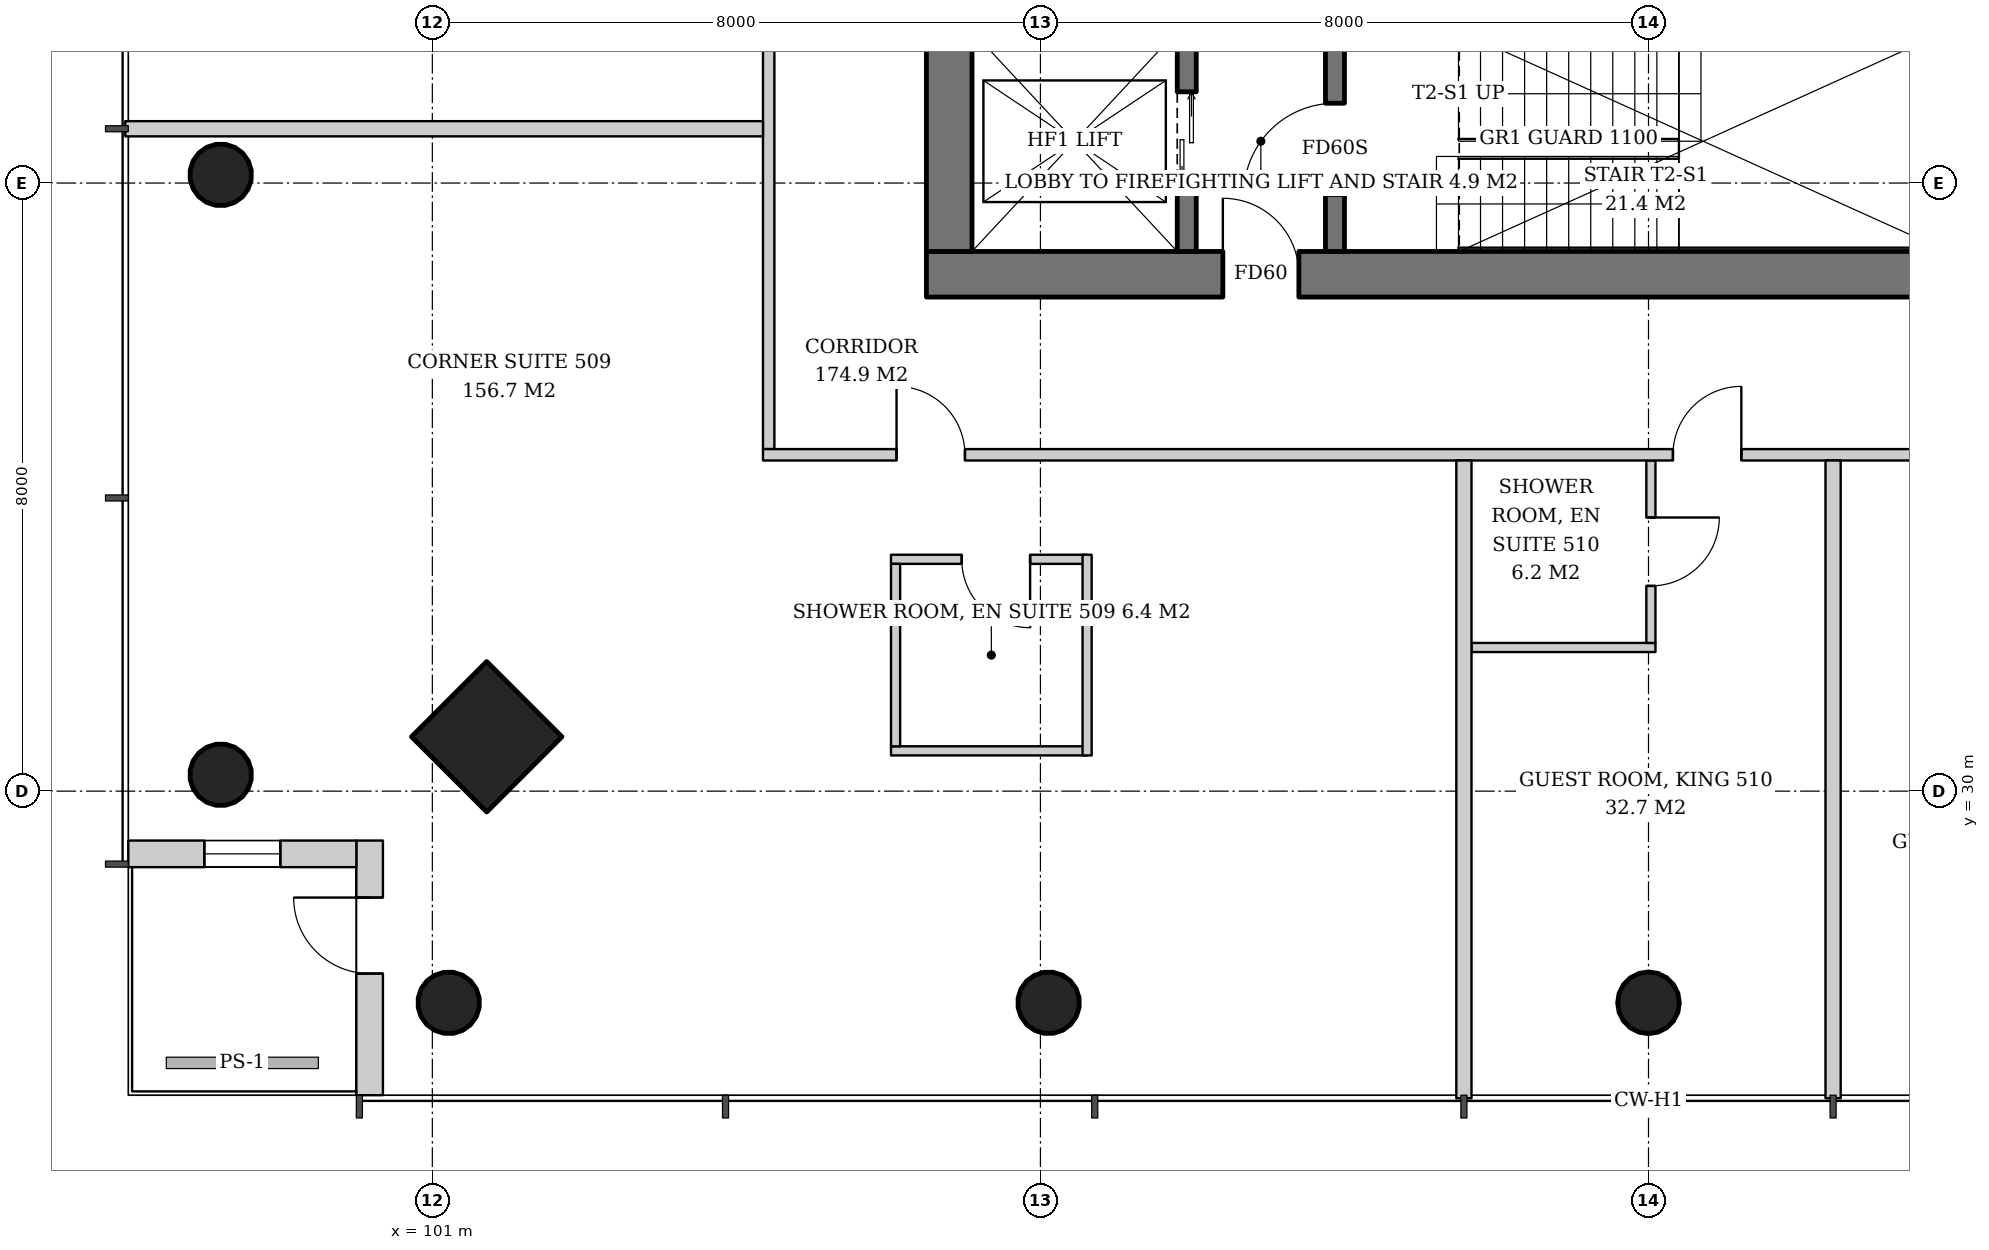
"""IFC4 building model, lengths in metres.
Left out: names, types, materials, properties, quantities, classifications, styles, units other than length and angle.
Written with IfcOpenShell. Run it as: python <this file> out.ifc"""

import sys

from ifc_helpers import new_model, si_unit, direction, frame, frame_2d, origin, origin_2d, place, context, subcontext, project, spatial, rectangle, hollow_circle, extrude, element, fill, save


model = new_model("IFC4")
c1 = context("Model", 3, precision=1e-05, world=origin(), true_north=direction((0.0, 1.0)))
c2 = subcontext(c1, "Body", "Model", "MODEL_VIEW")
j1 = project(units=[si_unit("LENGTHUNIT", "METRE"), si_unit("PLANEANGLEUNIT", "RADIAN")], contexts=[c1])
p1 = place(None, origin())
s1 = spatial("IfcSite", under=j1, at=p1, CompositionType="ELEMENT")
p2 = place(p1, origin())
s2 = spatial("IfcBuilding", under=s1, at=p2, CompositionType="ELEMENT")
p3 = place(p2, frame((0.0, 0.0, 24.8)))
s3 = spatial("IfcBuildingStorey", under=s2, at=p3, CompositionType="ELEMENT", Elevation=24.8)
p4 = place(p3, frame((101.664, 30.664, 0.0), z_axis=(0.043029647111, 0.043029647111, 0.998146732169), x_axis=(-0.707106781187, 0.707106781187, 0.0)))
e1 = element("IfcColumn", 1, at=p4, inside=s3, PredefinedType="COLUMN", context=c2, shape_type="SweptSolid", body=[
    extrude(rectangle(XDim=1.4, YDim=1.4, at=origin_2d()), origin(), (0.0, 0.0, 1.0), 3.807),
])
p5 = place(p3, frame((98.164, 30.164, 0.0), z_axis=(0.043029647111, 0.043029647111, 0.998146732169), x_axis=(-0.707106781187, 0.707106781187, 0.0)))
e2 = element("IfcColumn", 2, at=p5, inside=s3, PredefinedType="COLUMN", context=c2, shape_type="SweptSolid", body=[
    extrude(hollow_circle(Radius=0.406, WallThickness=0.03, at=origin_2d()), origin(), (0.0, 0.0, 1.0), 3.807),
])
p6 = place(p3, frame((98.164, 38.082, 0.0), z_axis=(0.043059525333, 0.021561848751, 0.998839808957), x_axis=(-0.44774654769, 0.894160516368, 0.0)))
e3 = element("IfcColumn", 3, at=p6, inside=s3, PredefinedType="COLUMN", context=c2, shape_type="SweptSolid", body=[
    extrude(hollow_circle(Radius=0.406, WallThickness=0.03, at=origin_2d()), origin(), (0.0, 0.0, 1.0), 3.804),
])
p7 = place(p3, frame((101.164, 27.164, 0.0), z_axis=(0.043029647111, 0.043029647111, 0.998146732169), x_axis=(-0.707106781187, 0.707106781187, 0.0)))
e4 = element("IfcColumn", 4, at=p7, inside=s3, PredefinedType="COLUMN", context=c2, shape_type="SweptSolid", body=[
    extrude(hollow_circle(Radius=0.406, WallThickness=0.03, at=origin_2d()), origin(), (0.0, 0.0, 1.0), 3.807),
])
p8 = place(p3, frame((109.082, 27.164, 0.0), z_axis=(0.021561848751, 0.043059525333, 0.998839808957), x_axis=(-0.894160516368, 0.44774654769, 0.0)))
e5 = element("IfcColumn", 5, at=p8, inside=s3, PredefinedType="COLUMN", context=c2, shape_type="SweptSolid", body=[
    extrude(hollow_circle(Radius=0.406, WallThickness=0.03, at=origin_2d()), origin(), (0.0, 0.0, 1.0), 3.804),
])
p9 = place(p3, frame((117.0, 27.164, 0.0), z_axis=(0.0, 0.043069538298, 0.999072076915), x_axis=(-1.0, 0.0, 0.0)))
e6 = element("IfcColumn", 6, at=p9, inside=s3, PredefinedType="COLUMN", context=c2, shape_type="SweptSolid", body=[
    extrude(hollow_circle(Radius=0.406, WallThickness=0.03, at=origin_2d()), origin(), (0.0, 0.0, 1.0), 3.803),
])
p10 = place(p3, frame((107.5, 36.8, 0.0), z_axis=(0.0, 0.0, 1.0), x_axis=(1.0, 0.0, 0.0)))
e7 = element("IfcWall", 7, at=p10, inside=s3, PredefinedType="SHEAR", context=c2, shape_type="SweptSolid", body=[
    extrude(rectangle(XDim=19.0, YDim=0.6, at=frame_2d((9.5, 0.0))), origin(), (0.0, 0.0, 1.0), 3.8),
])
p11 = place(p10, frame((3.9, 0.0, 0.0)))
e8 = element("IfcOpeningElement", 8, at=p11, cuts=e7, PredefinedType="OPENING", context=c2, shape_type="SweptSolid", body=[
    extrude(rectangle(XDim=1.0, YDim=2.1, at=frame_2d((0.5, 1.05))), frame((0.0, 0.31, 0.0), z_axis=(0.0, -1.0, 0.0), x_axis=(1.0, 0.0, 0.0)), (0.0, 0.0, 1.0), 0.62),
])
p12 = place(p10, frame((15.615, 0.0, 0.0)))
e9 = element("IfcOpeningElement", 9, at=p12, cuts=e7, PredefinedType="OPENING", context=c2, shape_type="SweptSolid", body=[
    extrude(rectangle(XDim=1.0, YDim=2.1, at=frame_2d((0.5, 1.05))), frame((0.0, 0.31, 0.0), z_axis=(0.0, -1.0, 0.0), x_axis=(1.0, 0.0, 0.0)), (0.0, 0.0, 1.0), 0.62),
])
p13 = place(p3, frame((107.8, 37.1, 0.0), z_axis=(0.0, 0.0, 1.0), x_axis=(0.0, 1.0, 0.0)))
e10 = element("IfcWall", 10, at=p13, inside=s3, PredefinedType="SHEAR", context=c2, shape_type="SweptSolid", body=[
    extrude(rectangle(XDim=17.8, YDim=0.6, at=frame_2d((8.9, 0.0))), origin(), (0.0, 0.0, 1.0), 3.8),
])
p14 = place(p13, frame((8.0, 0.0, 0.0)))
e11 = element("IfcOpeningElement", 11, at=p14, cuts=e10, PredefinedType="OPENING", context=c2, shape_type="SweptSolid", body=[
    extrude(rectangle(XDim=1.8, YDim=2.4, at=frame_2d((0.9, 1.2))), frame((0.0, 0.31, 0.0), z_axis=(0.0, -1.0, 0.0), x_axis=(1.0, 0.0, 0.0)), (0.0, 0.0, 1.0), 0.62),
])
p15 = place(p3, frame((100.175, 26.0, 0.0), z_axis=(0.0, 0.0, 1.0), x_axis=(0.0, 1.0, 0.0)))
e12 = element("IfcWall", 12, at=p15, inside=s3, PredefinedType="SOLIDWALL", context=c2, shape_type="SweptSolid", body=[
    extrude(rectangle(XDim=3.35, YDim=0.35, at=frame_2d((1.675, 0.0))), origin(), (0.0, 0.0, 1.0), 3.6),
])
p16 = place(p15, frame((1.6, 0.0, 0.0)))
e13 = element("IfcOpeningElement", 13, at=p16, cuts=e12, PredefinedType="OPENING", context=c2, shape_type="SweptSolid", body=[
    extrude(rectangle(XDim=1.0, YDim=2.4, at=frame_2d((0.5, 1.2))), frame((0.0, 0.185, 0.0), z_axis=(0.0, -1.0, 0.0), x_axis=(1.0, 0.0, 0.0)), (0.0, 0.0, 1.0), 0.37),
])
p17 = place(p3, frame((100.0, 29.175, 0.0), z_axis=(0.0, 0.0, 1.0), x_axis=(-1.0, 0.0, 0.0)))
e14 = element("IfcWall", 14, at=p17, inside=s3, PredefinedType="SOLIDWALL", context=c2, shape_type="SweptSolid", body=[
    extrude(rectangle(XDim=3.0, YDim=0.35, at=frame_2d((1.5, 0.0))), origin(), (0.0, 0.0, 1.0), 3.6),
])
p18 = place(p17, frame((1.0, 0.0, 0.9)))
e15 = element("IfcOpeningElement", 15, at=p18, cuts=e14, PredefinedType="OPENING", context=c2, shape_type="SweptSolid", body=[
    extrude(rectangle(XDim=1.0, YDim=2.4, at=frame_2d((0.5, 1.2))), frame((0.0, 0.185, 0.0), z_axis=(0.0, -1.0, 0.0), x_axis=(1.0, 0.0, 0.0)), (0.0, 0.0, 1.0), 0.37),
])
p19 = place(p3, frame((110.925, 37.1, 0.0), z_axis=(0.0, 0.0, 1.0), x_axis=(0.0, 1.0, 0.0)))
e16 = element("IfcWall", 16, at=p19, inside=s3, PredefinedType="SHEAR", context=c2, shape_type="SweptSolid", body=[
    extrude(rectangle(XDim=2.9, YDim=0.25, at=frame_2d((1.45, 0.0))), origin(), (0.0, 0.0, 1.0), 3.8),
])
p20 = place(p19, frame((0.8, 0.0, 0.0)))
e17 = element("IfcOpeningElement", 17, at=p20, cuts=e16, PredefinedType="OPENING", context=c2, shape_type="SweptSolid", body=[
    extrude(rectangle(XDim=1.3, YDim=2.2, at=frame_2d((0.65, 1.1))), frame((0.0, 0.135, 0.0), z_axis=(0.0, -1.0, 0.0), x_axis=(1.0, 0.0, 0.0)), (0.0, 0.0, 1.0), 0.27),
])
p21 = place(p3, frame((112.875, 37.1, 0.0), z_axis=(0.0, 0.0, 1.0), x_axis=(0.0, 1.0, 0.0)))
e18 = element("IfcWall", 18, at=p21, inside=s3, PredefinedType="SHEAR", context=c2, shape_type="SweptSolid", body=[
    extrude(rectangle(XDim=2.9, YDim=0.25, at=frame_2d((1.45, 0.0))), origin(), (0.0, 0.0, 1.0), 3.8),
])
p22 = place(p21, frame((0.75, 0.0, 0.0)))
e19 = element("IfcOpeningElement", 19, at=p22, cuts=e18, PredefinedType="OPENING", context=c2, shape_type="SweptSolid", body=[
    extrude(rectangle(XDim=1.2, YDim=2.1, at=frame_2d((0.6, 1.05))), frame((0.0, 0.135, 0.0), z_axis=(0.0, -1.0, 0.0), x_axis=(1.0, 0.0, 0.0)), (0.0, 0.0, 1.0), 0.27),
])
p23 = place(p3, frame((105.425, 57.65, 0.0), z_axis=(0.0, 0.0, 1.0), x_axis=(0.0, -1.0, 0.0)))
e20 = element("IfcWall", 20, at=p23, inside=s3, PredefinedType="PARTITIONING", context=c2, shape_type="SweptSolid", body=[
    extrude(rectangle(XDim=23.15, YDim=0.15, at=frame_2d((11.575, 0.0))), origin(), (0.0, 0.0, 1.0), 2.8),
])
p24 = place(p23, frame((1.757, 0.0, 0.0)))
e21 = element("IfcOpeningElement", 21, at=p24, cuts=e20, PredefinedType="OPENING", context=c2, shape_type="SweptSolid", body=[
    extrude(rectangle(XDim=0.9, YDim=2.1, at=frame_2d((0.45, 1.05))), frame((0.0, 0.085, 0.0), z_axis=(0.0, -1.0, 0.0), x_axis=(1.0, 0.0, 0.0)), (0.0, 0.0, 1.0), 0.17),
])
p25 = place(p23, frame((7.064, 0.0, 0.0)))
e22 = element("IfcOpeningElement", 22, at=p25, cuts=e20, PredefinedType="OPENING", context=c2, shape_type="SweptSolid", body=[
    extrude(rectangle(XDim=1.0, YDim=2.1, at=frame_2d((0.5, 1.05))), frame((0.0, 0.085, 0.0), z_axis=(0.0, -1.0, 0.0), x_axis=(1.0, 0.0, 0.0)), (0.0, 0.0, 1.0), 0.17),
])
p26 = place(p23, frame((10.428, 0.0, 0.0)))
e23 = element("IfcOpeningElement", 23, at=p26, cuts=e20, PredefinedType="OPENING", context=c2, shape_type="SweptSolid", body=[
    extrude(rectangle(XDim=0.9, YDim=2.1, at=frame_2d((0.45, 1.05))), frame((0.0, 0.085, 0.0), z_axis=(0.0, -1.0, 0.0), x_axis=(1.0, 0.0, 0.0)), (0.0, 0.0, 1.0), 0.17),
])
p27 = place(p23, frame((16.829, 0.0, 0.0)))
e24 = element("IfcOpeningElement", 24, at=p27, cuts=e20, PredefinedType="OPENING", context=c2, shape_type="SweptSolid", body=[
    extrude(rectangle(XDim=0.9, YDim=2.1, at=frame_2d((0.45, 1.05))), frame((0.0, 0.085, 0.0), z_axis=(0.0, -1.0, 0.0), x_axis=(1.0, 0.0, 0.0)), (0.0, 0.0, 1.0), 0.17),
])
p28 = place(p3, frame((105.35, 38.714, 0.0), z_axis=(0.0, 0.0, 1.0), x_axis=(-1.0, 0.0, 0.0)))
e25 = element("IfcWall", 25, at=p28, inside=s3, PredefinedType="PARTITIONING", context=c2, shape_type="SweptSolid", body=[
    extrude(rectangle(XDim=8.39, YDim=0.2, at=frame_2d((4.195, 0.0))), origin(), (0.0, 0.0, 1.0), 3.05),
])
p29 = place(p3, frame((109.614, 33.05, 0.0), z_axis=(0.0, 0.0, 1.0), x_axis=(-1.0, 0.0, 0.0)))
e26 = element("IfcWall", 26, at=p29, inside=s3, PredefinedType="PARTITIONING", context=c2, shape_type="SweptSolid", body=[
    extrude(rectangle(XDim=2.58, YDim=0.12, at=frame_2d((1.29, 0.0))), origin(), (0.0, 0.0, 1.0), 2.8),
])
p30 = place(p29, frame((0.75, 0.0, 0.0)))
e27 = element("IfcOpeningElement", 27, at=p30, cuts=e26, PredefinedType="OPENING", context=c2, shape_type="SweptSolid", body=[
    extrude(rectangle(XDim=0.9, YDim=2.1, at=frame_2d((0.45, 1.05))), frame((0.0, 0.07, 0.0), z_axis=(0.0, -1.0, 0.0), x_axis=(1.0, 0.0, 0.0)), (0.0, 0.0, 1.0), 0.14),
])
p31 = place(p3, frame((109.614, 30.53, 0.0), z_axis=(0.0, 0.0, 1.0), x_axis=(-1.0, 0.0, 0.0)))
e28 = element("IfcWall", 28, at=p31, inside=s3, PredefinedType="PARTITIONING", context=c2, shape_type="SweptSolid", body=[
    extrude(rectangle(XDim=2.58, YDim=0.12, at=frame_2d((1.29, 0.0))), origin(), (0.0, 0.0, 1.0), 2.8),
])
p32 = place(p3, frame((107.094, 32.99, 0.0), z_axis=(0.0, 0.0, 1.0), x_axis=(0.0, -1.0, 0.0)))
e29 = element("IfcWall", 29, at=p32, inside=s3, PredefinedType="PARTITIONING", context=c2, shape_type="SweptSolid", body=[
    extrude(rectangle(XDim=2.4, YDim=0.12, at=frame_2d((1.2, 0.0))), origin(), (0.0, 0.0, 1.0), 2.847),
])
p33 = place(p3, frame((109.614, 33.11, 0.0), z_axis=(0.0, 0.0, 1.0), x_axis=(0.0, -1.0, 0.0)))
e30 = element("IfcWall", 30, at=p33, inside=s3, PredefinedType="PARTITIONING", context=c2, shape_type="SweptSolid", body=[
    extrude(rectangle(XDim=2.64, YDim=0.12, at=frame_2d((1.32, 0.0))), origin(), (0.0, 0.0, 1.0), 3.6),
])
p34 = place(p3, frame((114.671, 31.89, 0.0), z_axis=(0.0, 0.0, 1.0), x_axis=(1.0, 0.0, 0.0)))
e31 = element("IfcWall", 31, at=p34, inside=s3, PredefinedType="PARTITIONING", context=c2, shape_type="SweptSolid", body=[
    extrude(rectangle(XDim=2.42, YDim=0.12, at=frame_2d((1.21, 0.0))), origin(), (0.0, 0.0, 1.0), 2.847),
])
p35 = place(p3, frame((117.031, 34.35, 0.0), z_axis=(0.0, 0.0, 1.0), x_axis=(0.0, -1.0, 0.0)))
e32 = element("IfcWall", 32, at=p35, inside=s3, PredefinedType="PARTITIONING", context=c2, shape_type="SweptSolid", body=[
    extrude(rectangle(XDim=2.4, YDim=0.12, at=frame_2d((1.2, 0.0))), origin(), (0.0, 0.0, 1.0), 3.6),
])
p36 = place(p35, frame((0.75, 0.0, 0.0)))
e33 = element("IfcOpeningElement", 33, at=p36, cuts=e32, PredefinedType="OPENING", context=c2, shape_type="SweptSolid", body=[
    extrude(rectangle(XDim=0.9, YDim=2.1, at=frame_2d((0.45, 1.05))), frame((0.0, 0.07, 0.0), z_axis=(0.0, -1.0, 0.0), x_axis=(1.0, 0.0, 0.0)), (0.0, 0.0, 1.0), 0.14),
])
p37 = place(p3, frame((105.35, 34.425, 0.0), z_axis=(0.0, 0.0, 1.0), x_axis=(1.0, 0.0, 0.0)))
e34 = element("IfcWall", 34, at=p37, inside=s3, PredefinedType="PARTITIONING", context=c2, shape_type="SweptSolid", body=[
    extrude(rectangle(XDim=23.15, YDim=0.15, at=frame_2d((11.575, 0.0))), origin(), (0.0, 0.0, 1.0), 2.8),
])
p38 = place(p37, frame((1.757, 0.0, 0.0)))
e35 = element("IfcOpeningElement", 35, at=p38, cuts=e34, PredefinedType="OPENING", context=c2, shape_type="SweptSolid", body=[
    extrude(rectangle(XDim=0.9, YDim=2.1, at=frame_2d((0.45, 1.05))), frame((0.0, 0.085, 0.0), z_axis=(0.0, -1.0, 0.0), x_axis=(1.0, 0.0, 0.0)), (0.0, 0.0, 1.0), 0.17),
])
p39 = place(p37, frame((11.971, 0.0, 0.0)))
e36 = element("IfcOpeningElement", 36, at=p39, cuts=e34, PredefinedType="OPENING", context=c2, shape_type="SweptSolid", body=[
    extrude(rectangle(XDim=0.9, YDim=2.1, at=frame_2d((0.45, 1.05))), frame((0.0, 0.085, 0.0), z_axis=(0.0, -1.0, 0.0), x_axis=(1.0, 0.0, 0.0)), (0.0, 0.0, 1.0), 0.17),
])
p40 = place(p37, frame((15.286, 0.0, 0.0)))
e37 = element("IfcOpeningElement", 37, at=p40, cuts=e34, PredefinedType="OPENING", context=c2, shape_type="SweptSolid", body=[
    extrude(rectangle(XDim=0.9, YDim=2.1, at=frame_2d((0.45, 1.05))), frame((0.0, 0.085, 0.0), z_axis=(0.0, -1.0, 0.0), x_axis=(1.0, 0.0, 0.0)), (0.0, 0.0, 1.0), 0.17),
])
for number, where, z_axis, x_axis in (
    (38, (114.572, 34.35, 0.0), (0.0, 0.0, 1.0), (0.0, -1.0, 0.0)),
    (39, (119.428, 34.35, 0.0), (0.0, 0.0, 1.0), (0.0, -1.0, 0.0)),
):
    element("IfcWall", number, at=place(p3, frame(where, z_axis=z_axis, x_axis=x_axis)), inside=s3, PredefinedType="PARTITIONING", context=c2, shape_type="SweptSolid", body=[
        extrude(rectangle(XDim=8.39, YDim=0.2, at=frame_2d((4.195, 0.0))), origin(), (0.0, 0.0, 1.0), 3.05),
    ])
p41 = place(p16, origin())
e40 = element("IfcDoor", 40, at=p41, inside=s3, OperationType="SINGLE_SWING_RIGHT", PredefinedType="DOOR", context=c2, shape_type="SweptSolid", body=[
    extrude(rectangle(XDim=1.0, YDim=2.4, at=frame_2d((0.5, 1.2))), frame((0.0, 0.025, 0.0), z_axis=(0.0, -1.0, 0.0), x_axis=(1.0, 0.0, 0.0)), (0.0, 0.0, 1.0), 0.05),
])
fill(e13, e40)
p42 = place(p18, origin())
e41 = element("IfcWindow", 41, at=p42, inside=s3, PartitioningType="SINGLE_PANEL", PredefinedType="WINDOW", context=c2, shape_type="SweptSolid", body=[
    extrude(rectangle(XDim=1.0, YDim=2.4, at=frame_2d((0.5, 1.2))), frame((0.0, 0.03, 0.0), z_axis=(0.0, -1.0, 0.0), x_axis=(1.0, 0.0, 0.0)), (0.0, 0.0, 1.0), 0.06),
])
fill(e15, e41)
p43 = place(p20, origin())
e42 = element("IfcDoor", 42, at=p43, inside=s3, OperationType="DOUBLE_DOOR_SLIDING", PredefinedType="DOOR", context=c2, shape_type="SweptSolid", body=[
    extrude(rectangle(XDim=1.3, YDim=2.2, at=frame_2d((0.65, 1.1))), frame((0.0, 0.025, 0.0), z_axis=(0.0, -1.0, 0.0), x_axis=(1.0, 0.0, 0.0)), (0.0, 0.0, 1.0), 0.05),
])
fill(e17, e42)
p44 = place(p22, origin())
e43 = element("IfcDoor", 43, at=p44, inside=s3, OperationType="SINGLE_SWING_LEFT", PredefinedType="DOOR", context=c2, shape_type="SweptSolid", body=[
    extrude(rectangle(XDim=1.2, YDim=2.1, at=frame_2d((0.6, 1.05))), frame((0.0, 0.025, 0.0), z_axis=(0.0, -1.0, 0.0), x_axis=(1.0, 0.0, 0.0)), (0.0, 0.0, 1.0), 0.05),
])
fill(e19, e43)
p45 = place(p11, origin())
e44 = element("IfcDoor", 44, at=p45, inside=s3, OperationType="SINGLE_SWING_LEFT", PredefinedType="DOOR", context=c2, shape_type="SweptSolid", body=[
    extrude(rectangle(XDim=1.0, YDim=2.1, at=frame_2d((0.5, 1.05))), frame((0.0, 0.025, 0.0), z_axis=(0.0, -1.0, 0.0), x_axis=(1.0, 0.0, 0.0)), (0.0, 0.0, 1.0), 0.05),
])
fill(e8, e44)
p46 = place(p30, origin())
e45 = element("IfcDoor", 45, at=p46, inside=s3, OperationType="SINGLE_SWING_LEFT", PredefinedType="DOOR", context=c2, shape_type="SweptSolid", body=[
    extrude(rectangle(XDim=0.9, YDim=2.1, at=frame_2d((0.45, 1.05))), frame((0.0, 0.025, 0.0), z_axis=(0.0, -1.0, 0.0), x_axis=(1.0, 0.0, 0.0)), (0.0, 0.0, 1.0), 0.05),
])
fill(e27, e45)
p47 = place(p36, origin())
e46 = element("IfcDoor", 46, at=p47, inside=s3, OperationType="SINGLE_SWING_LEFT", PredefinedType="DOOR", context=c2, shape_type="SweptSolid", body=[
    extrude(rectangle(XDim=0.9, YDim=2.1, at=frame_2d((0.45, 1.05))), frame((0.0, 0.025, 0.0), z_axis=(0.0, -1.0, 0.0), x_axis=(1.0, 0.0, 0.0)), (0.0, 0.0, 1.0), 0.05),
])
fill(e33, e46)
p48 = place(p38, origin())
e47 = element("IfcDoor", 47, at=p48, inside=s3, OperationType="SINGLE_SWING_LEFT", PredefinedType="DOOR", context=c2, shape_type="SweptSolid", body=[
    extrude(rectangle(XDim=0.9, YDim=2.1, at=frame_2d((0.45, 1.05))), frame((0.0, 0.025, 0.0), z_axis=(0.0, -1.0, 0.0), x_axis=(1.0, 0.0, 0.0)), (0.0, 0.0, 1.0), 0.05),
])
fill(e35, e47)
p49 = place(p39, origin())
e48 = element("IfcDoor", 48, at=p49, inside=s3, OperationType="SINGLE_SWING_RIGHT", PredefinedType="DOOR", context=c2, shape_type="SweptSolid", body=[
    extrude(rectangle(XDim=0.9, YDim=2.1, at=frame_2d((0.45, 1.05))), frame((0.0, 0.025, 0.0), z_axis=(0.0, -1.0, 0.0), x_axis=(1.0, 0.0, 0.0)), (0.0, 0.0, 1.0), 0.05),
])
fill(e36, e48)
save(model, sys.argv[1])
